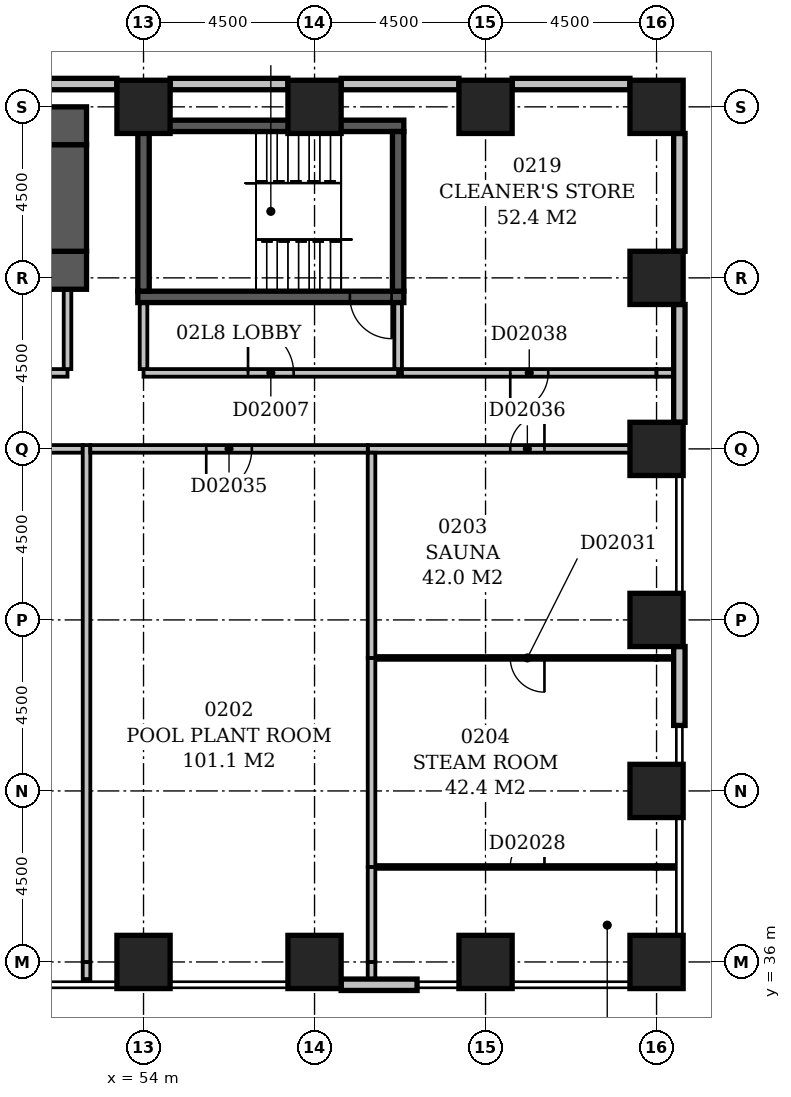
"""IFC4 building model, lengths in metres.
Left out: names, types, materials, properties, quantities, classifications, styles, units other than length and angle.
Written with IfcOpenShell. Run it as: python <this file> out.ifc"""

import sys

from ifc_helpers import new_model, si_unit, direction, frame, frame_2d, origin, origin_2d, place, context, subcontext, project, spatial, rectangle, extrude, element, fill, save


model = new_model("IFC4")
c1 = context("Model", 3, precision=1e-05, world=origin(), true_north=direction((0.0, 1.0)))
c2 = subcontext(c1, "Body", "Model", "MODEL_VIEW")
j1 = project(units=[si_unit("LENGTHUNIT", "METRE"), si_unit("PLANEANGLEUNIT", "RADIAN")], contexts=[c1])
p1 = place(None, origin())
s1 = spatial("IfcSite", under=j1, at=p1, CompositionType="ELEMENT")
p2 = place(p1, origin())
s2 = spatial("IfcBuilding", under=s1, at=p2, CompositionType="ELEMENT")
p3 = place(p2, frame((0.0, 0.0, 14.0)))
s3 = spatial("IfcBuildingStorey", under=s2, at=p3, CompositionType="ELEMENT", Elevation=14.0)
for number, where, z_axis, x_axis in (
    (1, (47.0, 54.2, -0.4), (0.0, 0.0, 1.0), (1.0, 0.0, 0.0)),
    (2, (47.0, 58.0, -0.4), (0.0, 0.0, 1.0), (1.0, 0.0, 0.0)),
):
    element("IfcWall", number, at=place(p3, frame(where, z_axis=z_axis, x_axis=x_axis)), inside=s3, PredefinedType="SHEAR", context=c2, shape_type="SweptSolid", body=[
        extrude(rectangle(XDim=5.5, YDim=1.0, at=frame_2d((2.75, 0.0))), origin(), (0.0, 0.0, 1.0), 5.0),
    ])
p4 = place(p3, frame((52.0, 54.7, -0.4), z_axis=(0.0, 0.0, 1.0), x_axis=(0.0, 1.0, 0.0)))
e3 = element("IfcWall", 3, at=p4, inside=s3, PredefinedType="SHEAR", context=c2, shape_type="SweptSolid", body=[
    extrude(rectangle(XDim=2.8, YDim=1.0, at=frame_2d((1.4, 0.0))), origin(), (0.0, 0.0, 1.0), 5.0),
])
p5 = place(p3, frame((53.85, 53.5, -0.4), z_axis=(0.0, 0.0, 1.0), x_axis=(1.0, 0.0, 0.0)))
e4 = element("IfcWall", 4, at=p5, inside=s3, PredefinedType="SHEAR", context=c2, shape_type="SweptSolid", body=[
    extrude(rectangle(XDim=7.0, YDim=0.3, at=frame_2d((3.5, 0.0))), origin(), (0.0, 0.0, 1.0), 5.0),
])
p6 = place(p5, frame((5.58, 0.0, 0.4)))
e5 = element("IfcOpeningElement", 5, at=p6, cuts=e4, PredefinedType="OPENING", context=c2, shape_type="SweptSolid", body=[
    extrude(rectangle(XDim=1.1, YDim=2.1, at=frame_2d((0.55, 1.05))), frame((0.0, 0.162, 0.0), z_axis=(0.0, -1.0, 0.0), x_axis=(1.0, 0.0, 0.0)), (0.0, 0.0, 1.0), 0.324),
])
p7 = place(p3, frame((53.85, 58.0, -0.4), z_axis=(0.0, 0.0, 1.0), x_axis=(1.0, 0.0, 0.0)))
e6 = element("IfcWall", 6, at=p7, inside=s3, PredefinedType="SHEAR", context=c2, shape_type="SweptSolid", body=[
    extrude(rectangle(XDim=7.0, YDim=0.3, at=frame_2d((3.5, 0.0))), origin(), (0.0, 0.0, 1.0), 5.0),
])
for number, where, z_axis, x_axis in (
    (7, (54.0, 53.65, -0.4), (0.0, 0.0, 1.0), (0.0, 1.0, 0.0)),
    (8, (60.7, 53.65, -0.4), (0.0, 0.0, 1.0), (0.0, 1.0, 0.0)),
):
    element("IfcWall", number, at=place(p3, frame(where, z_axis=z_axis, x_axis=x_axis)), inside=s3, PredefinedType="SHEAR", context=c2, shape_type="SweptSolid", body=[
        extrude(rectangle(XDim=4.2, YDim=0.3, at=frame_2d((2.1, 0.0))), origin(), (0.0, 0.0, 1.0), 5.0),
    ])
for number, where, z_axis, x_axis in (
    (9, (54.0, 36.0, -0.4), (0.0, 0.0, 1.0), (1.0, 0.0, 0.0)),
    (10, (58.5, 36.0, -0.4), (0.0, 0.0, 1.0), (1.0, 0.0, 0.0)),
    (11, (63.0, 36.0, -0.4), (0.0, 0.0, 1.0), (1.0, 0.0, 0.0)),
    (12, (67.5, 36.0, -0.4), (0.0, 0.0, 1.0), (1.0, 0.0, 0.0)),
    (13, (67.5, 40.5, -0.4), (0.0, 0.0, 1.0), (1.0, 0.0, 0.0)),
    (14, (67.5, 45.0, -0.4), (0.0, 0.0, 1.0), (1.0, 0.0, 0.0)),
    (15, (67.5, 49.5, -0.4), (0.0, 0.0, 1.0), (1.0, 0.0, 0.0)),
    (16, (67.5, 54.0, -0.4), (0.0, 0.0, 1.0), (1.0, 0.0, 0.0)),
    (17, (54.0, 58.5, -0.4), (0.0, 0.0, 1.0), (1.0, 0.0, 0.0)),
    (18, (58.5, 58.5, -0.4), (0.0, 0.0, 1.0), (1.0, 0.0, 0.0)),
    (19, (63.0, 58.5, -0.4), (0.0, 0.0, 1.0), (1.0, 0.0, 0.0)),
    (20, (67.5, 58.5, -0.4), (0.0, 0.0, 1.0), (1.0, 0.0, 0.0)),
):
    element("IfcColumn", number, at=place(p3, frame(where, z_axis=z_axis, x_axis=x_axis)), inside=s3, PredefinedType="COLUMN", context=c2, shape_type="SweptSolid", body=[
        extrude(rectangle(XDim=1.4, YDim=1.4, at=origin_2d()), origin(), (0.0, 0.0, 1.0), 5.0),
    ])
p8 = place(p3, frame((59.2, 35.4, 0.0), z_axis=(0.0, 0.0, 1.0), x_axis=(1.0, 0.0, 0.0)))
e21 = element("IfcWall", 21, at=p8, inside=s3, PredefinedType="STANDARD", context=c2, shape_type="SweptSolid", body=[
    extrude(rectangle(XDim=1.998, YDim=0.3, at=frame_2d((0.999, 0.0))), origin(), (0.0, 0.0, 1.0), 3.9),
])
p9 = place(p3, frame((68.1, 42.224, 0.0), z_axis=(0.0, 0.0, 1.0), x_axis=(0.0, 1.0, 0.0)))
e22 = element("IfcWall", 22, at=p9, inside=s3, PredefinedType="STANDARD", context=c2, shape_type="SweptSolid", body=[
    extrude(rectangle(XDim=2.076, YDim=0.3, at=frame_2d((1.038, 0.0))), origin(), (0.0, 0.0, 1.0), 3.9),
])
for number, where, z_axis, x_axis in (
    (23, (68.1, 50.2, 0.0), (0.0, 0.0, 1.0), (0.0, 1.0, 0.0)),
    (24, (68.1, 54.7, 0.0), (0.0, 0.0, 1.0), (0.0, 1.0, 0.0)),
    (25, (66.8, 59.1, 0.0), (0.0, 0.0, 1.0), (-1.0, 0.0, 0.0)),
    (26, (62.3, 59.1, 0.0), (0.0, 0.0, 1.0), (-1.0, 0.0, 0.0)),
    (27, (57.8, 59.1, 0.0), (0.0, 0.0, 1.0), (-1.0, 0.0, 0.0)),
    (28, (53.3, 59.1, 0.0), (0.0, 0.0, 1.0), (-1.0, 0.0, 0.0)),
):
    element("IfcWall", number, at=place(p3, frame(where, z_axis=z_axis, x_axis=x_axis)), inside=s3, PredefinedType="STANDARD", context=c2, shape_type="SweptSolid", body=[
        extrude(rectangle(XDim=3.1, YDim=0.3, at=frame_2d((1.55, 0.0))), origin(), (0.0, 0.0, 1.0), 3.9),
    ])
p10 = place(p3, frame((47.0, 51.5, 0.0), z_axis=(0.0, 0.0, 1.0), x_axis=(1.0, 0.0, 0.0)))
e29 = element("IfcWall", 29, at=p10, inside=s3, PredefinedType="PARTITIONING", context=c2, shape_type="SweptSolid", body=[
    extrude(rectangle(XDim=5.0, YDim=0.2, at=frame_2d((2.5, 0.0))), origin(), (0.0, 0.0, 1.0), 4.6),
])
p11 = place(p10, frame((1.9, 0.0, 0.0)))
e30 = element("IfcOpeningElement", 30, at=p11, cuts=e29, PredefinedType="OPENING", context=c2, shape_type="SweptSolid", body=[
    extrude(rectangle(XDim=1.2, YDim=2.1, at=frame_2d((0.6, 1.05))), frame((0.0, 0.112, 0.0), z_axis=(0.0, -1.0, 0.0), x_axis=(1.0, 0.0, 0.0)), (0.0, 0.0, 1.0), 0.224),
])
p12 = place(p3, frame((52.0, 51.6, 0.0), z_axis=(0.0, 0.0, 1.0), x_axis=(0.0, 1.0, 0.0)))
e31 = element("IfcWall", 31, at=p12, inside=s3, PredefinedType="PARTITIONING", context=c2, shape_type="SweptSolid", body=[
    extrude(rectangle(XDim=2.08, YDim=0.2, at=frame_2d((1.04, 0.0))), origin(), (0.0, 0.0, 1.0), 4.6),
])
p13 = place(p3, frame((54.0, 51.5, 0.0), z_axis=(0.0, 0.0, 1.0), x_axis=(1.0, 0.0, 0.0)))
e32 = element("IfcWall", 32, at=p13, inside=s3, PredefinedType="PARTITIONING", context=c2, shape_type="SweptSolid", body=[
    extrude(rectangle(XDim=6.7, YDim=0.2, at=frame_2d((3.35, 0.0))), origin(), (0.0, 0.0, 1.0), 4.6),
])
p14 = place(p13, frame((2.75, 0.0, 0.0)))
e33 = element("IfcOpeningElement", 33, at=p14, cuts=e32, PredefinedType="OPENING", context=c2, shape_type="SweptSolid", body=[
    extrude(rectangle(XDim=1.2, YDim=2.1, at=frame_2d((0.6, 1.05))), frame((0.0, 0.112, 0.0), z_axis=(0.0, -1.0, 0.0), x_axis=(1.0, 0.0, 0.0)), (0.0, 0.0, 1.0), 0.224),
])
p15 = place(p3, frame((60.7, 51.6, 0.0), z_axis=(0.0, 0.0, 1.0), x_axis=(0.0, 1.0, 0.0)))
e34 = element("IfcWall", 34, at=p15, inside=s3, PredefinedType="PARTITIONING", context=c2, shape_type="SweptSolid", body=[
    extrude(rectangle(XDim=1.73, YDim=0.2, at=frame_2d((0.865, 0.0))), origin(), (0.0, 0.0, 1.0), 4.6),
])
p16 = place(p3, frame((54.0, 51.6, 0.0), z_axis=(0.0, 0.0, 1.0), x_axis=(0.0, 1.0, 0.0)))
e35 = element("IfcWall", 35, at=p16, inside=s3, PredefinedType="PARTITIONING", context=c2, shape_type="SweptSolid", body=[
    extrude(rectangle(XDim=1.73, YDim=0.2, at=frame_2d((0.865, 0.0))), origin(), (0.0, 0.0, 1.0), 3.9),
])
for number, where, z_axis, x_axis in (
    (36, (52.5, 36.0, 0.0), (0.0, 0.0, 1.0), (0.0, -1.0, 0.0)),
    (37, (60.0, 36.0, 0.0), (0.0, 0.0, 1.0), (0.0, -1.0, 0.0)),
):
    element("IfcWall", number, at=place(p3, frame(where, z_axis=z_axis, x_axis=x_axis)), inside=s3, PredefinedType="PARTITIONING", context=c2, shape_type="SweptSolid", body=[
        extrude(rectangle(XDim=0.45, YDim=0.2, at=frame_2d((0.225, 0.0))), origin(), (0.0, 0.0, 1.0), 4.6),
    ])
p17 = place(p3, frame((60.0, 38.5, 0.0), z_axis=(0.0, 0.0, 1.0), x_axis=(0.0, -1.0, 0.0)))
e38 = element("IfcWall", 38, at=p17, inside=s3, PredefinedType="PARTITIONING", context=c2, shape_type="SweptSolid", body=[
    extrude(rectangle(XDim=2.5, YDim=0.2, at=frame_2d((1.25, 0.0))), origin(), (0.0, 0.0, 1.0), 4.6),
])
p18 = place(p3, frame((67.5, 38.5, 0.0), z_axis=(0.0, 0.0, 1.0), x_axis=(-1.0, 0.0, 0.0)))
e39 = element("IfcWall", 39, at=p18, inside=s3, PredefinedType="PARTITIONING", context=c2, shape_type="SweptSolid", body=[
    extrude(rectangle(XDim=7.4, YDim=0.1, at=frame_2d((3.7, 0.0))), origin(), (0.0, 0.0, 1.0), 4.6),
])
p19 = place(p18, frame((2.95, 0.0, 0.0)))
e40 = element("IfcOpeningElement", 40, at=p19, cuts=e39, PredefinedType="OPENING", context=c2, shape_type="SweptSolid", body=[
    extrude(rectangle(XDim=0.9, YDim=2.1, at=frame_2d((0.45, 1.05))), frame((0.0, 0.062, 0.0), z_axis=(0.0, -1.0, 0.0), x_axis=(1.0, 0.0, 0.0)), (0.0, 0.0, 1.0), 0.124),
])
p20 = place(p3, frame((67.95, 38.5, 0.0), z_axis=(0.0, 0.0, 1.0), x_axis=(-1.0, 0.0, 0.0)))
e41 = element("IfcWall", 41, at=p20, inside=s3, PredefinedType="PARTITIONING", context=c2, shape_type="SweptSolid", body=[
    extrude(rectangle(XDim=0.45, YDim=0.1, at=frame_2d((0.225, 0.0))), origin(), (0.0, 0.0, 1.0), 4.6),
])
p21 = place(p3, frame((60.0, 44.0, 0.0), z_axis=(0.0, 0.0, 1.0), x_axis=(0.0, -1.0, 0.0)))
e42 = element("IfcWall", 42, at=p21, inside=s3, PredefinedType="PARTITIONING", context=c2, shape_type="SweptSolid", body=[
    extrude(rectangle(XDim=5.5, YDim=0.2, at=frame_2d((2.75, 0.0))), origin(), (0.0, 0.0, 1.0), 4.6),
])
p22 = place(p3, frame((67.5, 44.0, 0.0), z_axis=(0.0, 0.0, 1.0), x_axis=(-1.0, 0.0, 0.0)))
e43 = element("IfcWall", 43, at=p22, inside=s3, PredefinedType="PARTITIONING", context=c2, shape_type="SweptSolid", body=[
    extrude(rectangle(XDim=7.4, YDim=0.1, at=frame_2d((3.7, 0.0))), origin(), (0.0, 0.0, 1.0), 4.6),
])
p23 = place(p22, frame((2.95, 0.0, 0.0)))
e44 = element("IfcOpeningElement", 44, at=p23, cuts=e43, PredefinedType="OPENING", context=c2, shape_type="SweptSolid", body=[
    extrude(rectangle(XDim=0.9, YDim=2.1, at=frame_2d((0.45, 1.05))), frame((0.0, 0.062, 0.0), z_axis=(0.0, -1.0, 0.0), x_axis=(1.0, 0.0, 0.0)), (0.0, 0.0, 1.0), 0.124),
])
p24 = place(p3, frame((67.95, 44.0, 0.0), z_axis=(0.0, 0.0, 1.0), x_axis=(-1.0, 0.0, 0.0)))
e45 = element("IfcWall", 45, at=p24, inside=s3, PredefinedType="PARTITIONING", context=c2, shape_type="SweptSolid", body=[
    extrude(rectangle(XDim=0.45, YDim=0.1, at=frame_2d((0.225, 0.0))), origin(), (0.0, 0.0, 1.0), 4.6),
])
p25 = place(p3, frame((22.5, 49.5, 0.0), z_axis=(0.0, 0.0, 1.0), x_axis=(1.0, 0.0, 0.0)))
e46 = element("IfcWall", 46, at=p25, inside=s3, PredefinedType="PARTITIONING", context=c2, shape_type="SweptSolid", body=[
    extrude(rectangle(XDim=29.9, YDim=0.2, at=frame_2d((14.95, 0.0))), origin(), (0.0, 0.0, 1.0), 4.6),
])
p26 = place(p25, frame((14.125, 0.0, 0.0)))
e47 = element("IfcOpeningElement", 47, at=p26, cuts=e46, PredefinedType="OPENING", context=c2, shape_type="SweptSolid", body=[
    extrude(rectangle(XDim=1.8, YDim=2.4, at=frame_2d((0.9, 1.2))), frame((0.0, 0.112, 0.0), z_axis=(0.0, -1.0, 0.0), x_axis=(1.0, 0.0, 0.0)), (0.0, 0.0, 1.0), 0.224),
])
p27 = place(p3, frame((52.5, 49.6, 0.0), z_axis=(0.0, 0.0, 1.0), x_axis=(0.0, -1.0, 0.0)))
e48 = element("IfcWall", 48, at=p27, inside=s3, PredefinedType="PARTITIONING", context=c2, shape_type="SweptSolid", body=[
    extrude(rectangle(XDim=13.6, YDim=0.2, at=frame_2d((6.8, 0.0))), origin(), (0.0, 0.0, 1.0), 4.6),
])
p28 = place(p3, frame((52.6, 49.5, 0.0), z_axis=(0.0, 0.0, 1.0), x_axis=(1.0, 0.0, 0.0)))
e49 = element("IfcWall", 49, at=p28, inside=s3, PredefinedType="PARTITIONING", context=c2, shape_type="SweptSolid", body=[
    extrude(rectangle(XDim=7.3, YDim=0.2, at=frame_2d((3.65, 0.0))), origin(), (0.0, 0.0, 1.0), 4.6),
])
p29 = place(p28, frame((3.05, 0.0, 0.0)))
e50 = element("IfcOpeningElement", 50, at=p29, cuts=e49, PredefinedType="OPENING", context=c2, shape_type="SweptSolid", body=[
    extrude(rectangle(XDim=1.2, YDim=2.1, at=frame_2d((0.6, 1.05))), frame((0.0, 0.112, 0.0), z_axis=(0.0, -1.0, 0.0), x_axis=(1.0, 0.0, 0.0)), (0.0, 0.0, 1.0), 0.224),
])
p30 = place(p3, frame((60.0, 49.4, 0.0), z_axis=(0.0, 0.0, 1.0), x_axis=(0.0, -1.0, 0.0)))
e51 = element("IfcWall", 51, at=p30, inside=s3, PredefinedType="PARTITIONING", context=c2, shape_type="SweptSolid", body=[
    extrude(rectangle(XDim=5.4, YDim=0.2, at=frame_2d((2.7, 0.0))), origin(), (0.0, 0.0, 1.0), 4.6),
])
p31 = place(p3, frame((59.9, 49.5, 0.0), z_axis=(0.0, 0.0, 1.0), x_axis=(1.0, 0.0, 0.0)))
e52 = element("IfcWall", 52, at=p31, inside=s3, PredefinedType="PARTITIONING", context=c2, shape_type="SweptSolid", body=[
    extrude(rectangle(XDim=7.6, YDim=0.2, at=frame_2d((3.8, 0.0))), origin(), (0.0, 0.0, 1.0), 4.6),
])
p32 = place(p31, frame((3.75, 0.0, 0.0)))
e53 = element("IfcOpeningElement", 53, at=p32, cuts=e52, PredefinedType="OPENING", context=c2, shape_type="SweptSolid", body=[
    extrude(rectangle(XDim=0.9, YDim=2.1, at=frame_2d((0.45, 1.05))), frame((0.0, 0.112, 0.0), z_axis=(0.0, -1.0, 0.0), x_axis=(1.0, 0.0, 0.0)), (0.0, 0.0, 1.0), 0.224),
])
p33 = place(p3, frame((67.5, 51.5, 0.0), z_axis=(0.0, 0.0, 1.0), x_axis=(-1.0, 0.0, 0.0)))
e54 = element("IfcWall", 54, at=p33, inside=s3, PredefinedType="PARTITIONING", context=c2, shape_type="SweptSolid", body=[
    extrude(rectangle(XDim=6.7, YDim=0.2, at=frame_2d((3.35, 0.0))), origin(), (0.0, 0.0, 1.0), 4.6),
])
p34 = place(p33, frame((2.85, 0.0, 0.0)))
e55 = element("IfcOpeningElement", 55, at=p34, cuts=e54, PredefinedType="OPENING", context=c2, shape_type="SweptSolid", body=[
    extrude(rectangle(XDim=1.0, YDim=2.1, at=frame_2d((0.5, 1.05))), frame((0.0, 0.112, 0.0), z_axis=(0.0, -1.0, 0.0), x_axis=(1.0, 0.0, 0.0)), (0.0, 0.0, 1.0), 0.224),
])
p35 = place(p3, frame((67.95, 51.5, 0.0), z_axis=(0.0, 0.0, 1.0), x_axis=(-1.0, 0.0, 0.0)))
e56 = element("IfcWall", 56, at=p35, inside=s3, PredefinedType="PARTITIONING", context=c2, shape_type="SweptSolid", body=[
    extrude(rectangle(XDim=0.45, YDim=0.2, at=frame_2d((0.225, 0.0))), origin(), (0.0, 0.0, 1.0), 4.6),
])
p36 = place(p14, origin())
e57 = element("IfcDoor", 57, at=p36, inside=s3, OperationType="SINGLE_SWING_LEFT", PredefinedType="DOOR", context=c2, shape_type="SweptSolid", body=[
    extrude(rectangle(XDim=1.2, YDim=2.1, at=frame_2d((0.6, 1.05))), frame((0.0, 0.025, 0.0), z_axis=(0.0, -1.0, 0.0), x_axis=(1.0, 0.0, 0.0)), (0.0, 0.0, 1.0), 0.05),
])
fill(e33, e57)
p37 = place(p6, origin())
e58 = element("IfcDoor", 58, at=p37, inside=s3, OperationType="SINGLE_SWING_RIGHT", PredefinedType="DOOR", context=c2, shape_type="SweptSolid", body=[
    extrude(rectangle(XDim=1.1, YDim=2.1, at=frame_2d((0.55, 1.05))), frame((0.0, 0.025, 0.0), z_axis=(0.0, -1.0, 0.0), x_axis=(1.0, 0.0, 0.0)), (0.0, 0.0, 1.0), 0.05),
])
fill(e5, e58)
p38 = place(p19, frame((0.9, 0.0, 0.0), z_axis=(0.0, 0.0, 1.0), x_axis=(-1.0, 0.0, 0.0)))
e59 = element("IfcDoor", 59, at=p38, inside=s3, OperationType="SINGLE_SWING_RIGHT", PredefinedType="DOOR", context=c2, shape_type="SweptSolid", body=[
    extrude(rectangle(XDim=0.9, YDim=2.1, at=frame_2d((0.45, 1.05))), frame((0.0, 0.025, 0.0), z_axis=(0.0, -1.0, 0.0), x_axis=(1.0, 0.0, 0.0)), (0.0, 0.0, 1.0), 0.05),
])
fill(e40, e59)
p39 = place(p23, origin())
e60 = element("IfcDoor", 60, at=p39, inside=s3, OperationType="SINGLE_SWING_LEFT", PredefinedType="DOOR", context=c2, shape_type="SweptSolid", body=[
    extrude(rectangle(XDim=0.9, YDim=2.1, at=frame_2d((0.45, 1.05))), frame((0.0, 0.025, 0.0), z_axis=(0.0, -1.0, 0.0), x_axis=(1.0, 0.0, 0.0)), (0.0, 0.0, 1.0), 0.05),
])
fill(e44, e60)
p40 = place(p29, frame((1.2, 0.0, 0.0), z_axis=(0.0, 0.0, 1.0), x_axis=(-1.0, 0.0, 0.0)))
e61 = element("IfcDoor", 61, at=p40, inside=s3, OperationType="SINGLE_SWING_RIGHT", PredefinedType="DOOR", context=c2, shape_type="SweptSolid", body=[
    extrude(rectangle(XDim=1.2, YDim=2.1, at=frame_2d((0.6, 1.05))), frame((0.0, 0.025, 0.0), z_axis=(0.0, -1.0, 0.0), x_axis=(1.0, 0.0, 0.0)), (0.0, 0.0, 1.0), 0.05),
])
fill(e50, e61)
p41 = place(p32, frame((0.9, 0.0, 0.0), z_axis=(0.0, 0.0, 1.0), x_axis=(-1.0, 0.0, 0.0)))
e62 = element("IfcDoor", 62, at=p41, inside=s3, OperationType="SINGLE_SWING_LEFT", PredefinedType="DOOR", context=c2, shape_type="SweptSolid", body=[
    extrude(rectangle(XDim=0.9, YDim=2.1, at=frame_2d((0.45, 1.05))), frame((0.0, 0.025, 0.0), z_axis=(0.0, -1.0, 0.0), x_axis=(1.0, 0.0, 0.0)), (0.0, 0.0, 1.0), 0.05),
])
fill(e53, e62)
p42 = place(p34, frame((1.0, 0.0, 0.0), z_axis=(0.0, 0.0, 1.0), x_axis=(-1.0, 0.0, 0.0)))
e63 = element("IfcDoor", 63, at=p42, inside=s3, OperationType="SINGLE_SWING_LEFT", PredefinedType="DOOR", context=c2, shape_type="SweptSolid", body=[
    extrude(rectangle(XDim=1.0, YDim=2.1, at=frame_2d((0.5, 1.05))), frame((0.0, 0.025, 0.0), z_axis=(0.0, -1.0, 0.0), x_axis=(1.0, 0.0, 0.0)), (0.0, 0.0, 1.0), 0.05),
])
fill(e55, e63)
save(model, sys.argv[1])
